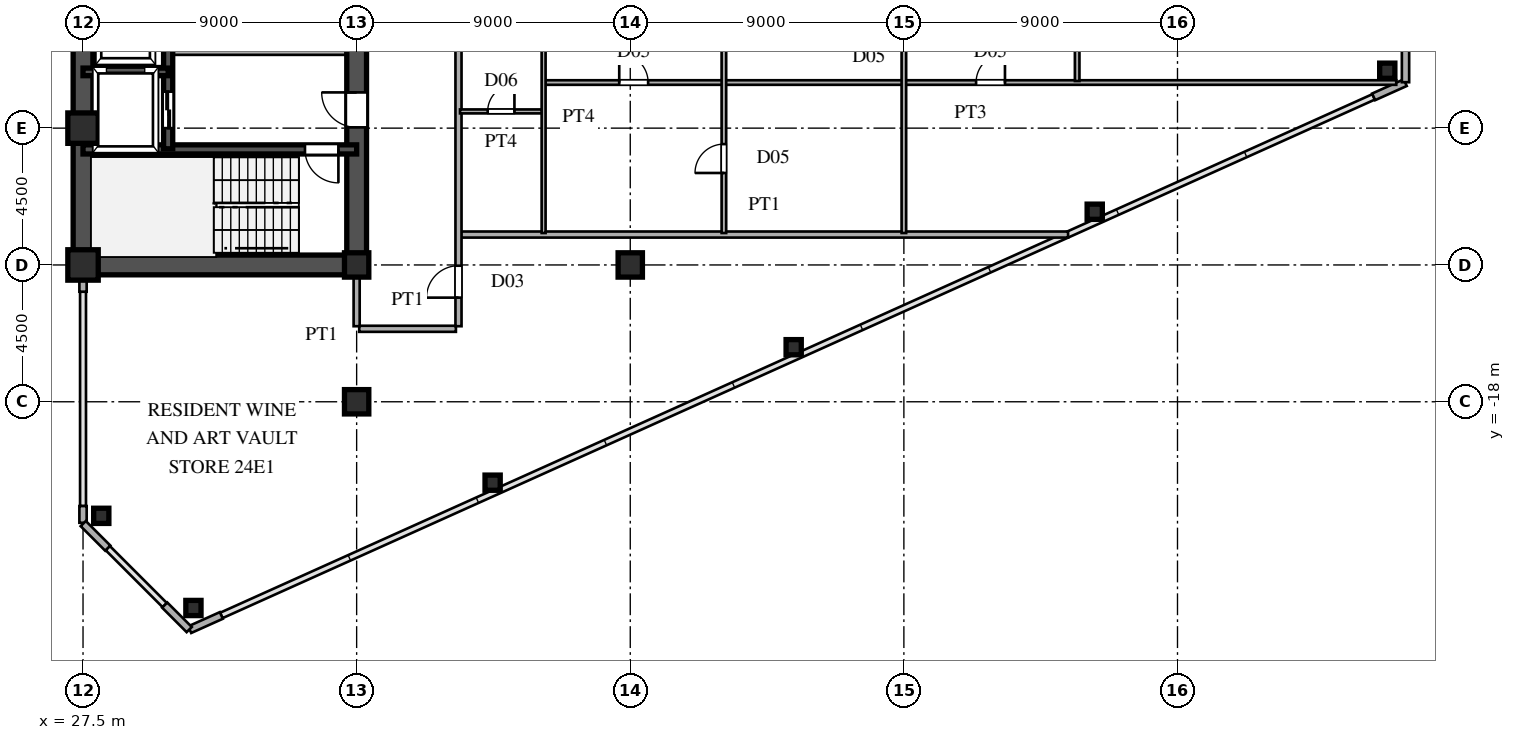
"""IFC4 building model, lengths in metres.
Left out: names, types, materials, properties, quantities, classifications, styles, units other than length and angle.
Written with IfcOpenShell. Run it as: python <this file> out.ifc"""

import sys

from ifc_helpers import new_model, si_unit, direction, frame, frame_2d, origin, origin_2d, place, context, subcontext, project, spatial, rectangle, hollow_rectangle, i_section, extrude, source, transform, mapped, element, fill, save


model = new_model("IFC4")
c1 = context("Model", 3, precision=1e-05, world=origin(), true_north=direction((0.0, 1.0)))
c2 = subcontext(c1, "Body", "Model", "MODEL_VIEW")
j1 = project(units=[si_unit("LENGTHUNIT", "METRE"), si_unit("PLANEANGLEUNIT", "RADIAN")], contexts=[c1])
p1 = place(None, origin())
s1 = spatial("IfcSite", under=j1, at=p1, CompositionType="ELEMENT")
p2 = place(p1, origin())
s2 = spatial("IfcBuilding", under=s1, at=p2, CompositionType="ELEMENT")
p3 = place(p2, frame((0.0, 0.0, 92.4)))
s3 = spatial("IfcBuildingStorey", under=s2, at=p3, CompositionType="ELEMENT", Elevation=92.4)
m1 = source(origin(), c2, "Body", "SweptSolid", [
    extrude(hollow_rectangle(XDim=1.0, YDim=1.0, WallThickness=0.042, at=origin_2d()), origin(), (0.0, 0.0, 1.0), 3.6),
])
for number, where, z_axis, x_axis in (
    (1, (27.5, -13.5, 0.0), (0.0, 0.0, 1.0), (1.0, 0.0, 0.0)),
    (2, (27.5, -9.0, 0.0), (0.0, 0.0, 1.0), (1.0, 0.0, 0.0)),
):
    element("IfcColumn", number, at=place(p3, frame(where, z_axis=z_axis, x_axis=x_axis)), inside=s3, PredefinedType="COLUMN", context=c2, shape_type="MappedRepresentation", body=[
        mapped(m1, transform((0.0, 0.0, 0.0), scale=1.0)),
    ])
m2 = source(origin(), c2, "Body", "SweptSolid", [
    extrude(i_section(OverallWidth=0.8, OverallDepth=0.8, WebThickness=0.032, FlangeThickness=0.05, at=origin_2d()), origin(), (0.0, 0.0, 1.0), 3.6),
])
for number, where, z_axis, x_axis in (
    (3, (36.5, -18.0, 0.0), (0.0, 0.0, 1.0), (1.0, 0.0, 0.0)),
    (4, (36.5, -13.5, 0.0), (0.0, 0.0, 1.0), (1.0, 0.0, 0.0)),
    (5, (45.5, -13.5, 0.0), (0.0, 0.0, 1.0), (1.0, 0.0, 0.0)),
):
    element("IfcColumn", number, at=place(p3, frame(where, z_axis=z_axis, x_axis=x_axis)), inside=s3, PredefinedType="COLUMN", context=c2, shape_type="MappedRepresentation", body=[
        mapped(m2, transform((0.0, 0.0, 0.0), scale=1.0)),
    ])
m3 = source(origin(), c2, "Body", "SweptSolid", [
    extrude(hollow_rectangle(XDim=0.5, YDim=0.5, WallThickness=0.02, at=origin_2d()), origin(), (0.0, 0.0, 1.0), 3.6),
])
for number, where, z_axis, x_axis in (
    (6, (31.131, -24.783, 0.0), (0.0, 0.0, 1.0), (1.0, 0.0, 0.0)),
    (7, (70.4, -7.112, 0.0), (0.0, 0.0, 1.0), (1.0, 0.0, 0.0)),
    (8, (28.1, -21.751, 0.0), (0.0, 0.0, 1.0), (1.0, 0.0, 0.0)),
    (9, (40.973, -20.661, 0.0), (0.0, 0.0, 1.0), (1.0, 0.0, 0.0)),
    (10, (50.875, -16.205, 0.0), (0.0, 0.0, 1.0), (1.0, 0.0, 0.0)),
    (11, (60.778, -11.749, 0.0), (0.0, 0.0, 1.0), (1.0, 0.0, 0.0)),
):
    element("IfcColumn", number, at=place(p3, frame(where, z_axis=z_axis, x_axis=x_axis)), inside=s3, PredefinedType="COLUMN", context=c2, shape_type="MappedRepresentation", body=[
        mapped(m3, transform((0.0, 0.0, 0.0), scale=1.0)),
    ])
for number, where, z_axis, x_axis in (
    (12, (31.009, -25.496, 0.0), (0.0, 0.0, 1.0), (0.912, 0.41, 0.0)),
    (13, (69.951, -7.972, 0.0), (0.0, 0.0, 1.0), (0.912, 0.41, 0.0)),
    (14, (71.0, -7.49, 0.0), (0.0, 0.0, 1.0), (0.0, 1.0, 0.0)),
):
    element("IfcWall", number, at=place(p3, frame(where, z_axis=z_axis, x_axis=x_axis)), inside=s3, PredefinedType="SOLIDWALL", context=c2, shape_type="SweptSolid", body=[
        extrude(rectangle(XDim=1.14, YDim=0.24, at=frame_2d((0.57, 0.0))), origin(), (0.0, 0.0, 1.0), 3.38),
    ])
p4 = place(p3, frame((27.5, -21.98, 0.0), z_axis=(0.0, 0.0, 1.0), x_axis=(0.0, 1.0, 0.0)))
e15 = element("IfcWall", 15, at=p4, inside=s3, PredefinedType="SOLIDWALL", context=c2, shape_type="SweptSolid", body=[
    extrude(rectangle(XDim=0.55, YDim=0.24, at=frame_2d((0.275, 0.0))), origin(), (0.0, 0.0, 1.0), 3.38),
])
p5 = place(p3, frame((27.5, -14.38, 0.0), z_axis=(0.0, 0.0, 1.0), x_axis=(0.0, 1.0, 0.0)))
e16 = element("IfcWall", 16, at=p5, inside=s3, PredefinedType="SOLIDWALL", context=c2, shape_type="SweptSolid", body=[
    extrude(rectangle(XDim=0.55, YDim=0.24, at=frame_2d((0.275, 0.0))), origin(), (0.0, 0.0, 1.0), 2.88),
])
for number, where, z_axis, x_axis in (
    (17, (27.507, -22.007, 0.0), (0.0, 0.0, 1.0), (0.707, -0.707, 0.0)),
    (18, (30.187, -24.687, 0.0), (0.0, 0.0, 1.0), (0.707, -0.707, 0.0)),
):
    element("IfcWall", number, at=place(p3, frame(where, z_axis=z_axis, x_axis=x_axis)), inside=s3, PredefinedType="SOLIDWALL", context=c2, shape_type="SweptSolid", body=[
        extrude(rectangle(XDim=1.14, YDim=0.24, at=frame_2d((0.57, 0.0))), origin(), (0.0, 0.0, 1.0), 3.38),
    ])
p6 = place(p3, frame((27.5, -13.5, 0.0), z_axis=(0.0, 0.0, 1.0), x_axis=(0.0, 1.0, 0.0)))
e19 = element("IfcWall", 19, at=p6, inside=s3, PredefinedType="SHEAR", context=c2, shape_type="SweptSolid", body=[
    extrude(rectangle(XDim=12.2, YDim=0.65, at=frame_2d((6.1, 0.0))), origin(), (0.0, 0.0, 1.0), 3.38),
])
p7 = place(p3, frame((27.5, -13.5, 0.0), z_axis=(0.0, 0.0, 1.0), x_axis=(1.0, 0.0, 0.0)))
e20 = element("IfcWall", 20, at=p7, inside=s3, PredefinedType="SHEAR", context=c2, shape_type="SweptSolid", body=[
    extrude(rectangle(XDim=9.0, YDim=0.65, at=frame_2d((4.5, 0.0))), origin(), (0.0, 0.0, 1.0), 3.38),
])
p8 = place(p3, frame((36.5, -13.65, 0.0), z_axis=(0.0, 0.0, 1.0), x_axis=(0.0, 1.0, 0.0)))
e21 = element("IfcWall", 21, at=p8, inside=s3, PredefinedType="SHEAR", context=c2, shape_type="SweptSolid", body=[
    extrude(rectangle(XDim=7.15, YDim=0.65, at=frame_2d((3.575, 0.0))), origin(), (0.0, 0.0, 1.0), 3.38),
])
p9 = place(p8, frame((4.675, 0.0, 0.0)))
e22 = element("IfcOpeningElement", 22, at=p9, cuts=e21, PredefinedType="OPENING", context=c2, shape_type="SweptSolid", body=[
    extrude(rectangle(XDim=1.15, YDim=2.2, at=frame_2d((0.575, 1.1))), frame((0.0, 0.335, 0.0), z_axis=(0.0, -1.0, 0.0), x_axis=(1.0, 0.0, 0.0)), (0.0, 0.0, 1.0), 0.67),
])
p10 = place(p3, frame((27.5, -9.7, 0.0), z_axis=(0.0, 0.0, 1.0), x_axis=(1.0, 0.0, 0.0)))
e23 = element("IfcWall", 23, at=p10, inside=s3, PredefinedType="SHEAR", context=c2, shape_type="SweptSolid", body=[
    extrude(rectangle(XDim=9.0, YDim=0.3, at=frame_2d((4.5, 0.0))), origin(), (0.0, 0.0, 1.0), 3.38),
])
p11 = place(p10, frame((7.3, 0.0, 0.0)))
e24 = element("IfcOpeningElement", 24, at=p11, cuts=e23, PredefinedType="OPENING", context=c2, shape_type="SweptSolid", body=[
    extrude(rectangle(XDim=1.1, YDim=2.2, at=frame_2d((0.55, 1.1))), frame((0.0, 0.16, 0.0), z_axis=(0.0, -1.0, 0.0), x_axis=(1.0, 0.0, 0.0)), (0.0, 0.0, 1.0), 0.32),
])
p12 = place(p3, frame((27.5, -7.15, 0.0), z_axis=(0.0, 0.0, 1.0), x_axis=(1.0, 0.0, 0.0)))
e25 = element("IfcWall", 25, at=p12, inside=s3, PredefinedType="SHEAR", context=c2, shape_type="SweptSolid", body=[
    extrude(rectangle(XDim=2.8, YDim=0.25, at=frame_2d((1.4, 0.0))), origin(), (0.0, 0.0, 1.0), 3.38),
])
p13 = place(p3, frame((30.3, -9.68, 0.0), z_axis=(0.0, 0.0, 1.0), x_axis=(0.0, 1.0, 0.0)))
e26 = element("IfcWall", 26, at=p13, inside=s3, PredefinedType="SHEAR", context=c2, shape_type="SweptSolid", body=[
    extrude(rectangle(XDim=2.56, YDim=0.3, at=frame_2d((1.28, 0.0))), origin(), (0.0, 0.0, 1.0), 3.38),
])
p14 = place(p13, frame((0.68, 0.0, 0.0)))
e27 = element("IfcOpeningElement", 27, at=p14, cuts=e26, PredefinedType="OPENING", context=c2, shape_type="SweptSolid", body=[
    extrude(rectangle(XDim=1.2, YDim=2.25, at=frame_2d((0.6, 1.125))), frame((0.0, 0.16, 0.0), z_axis=(0.0, -1.0, 0.0), x_axis=(1.0, 0.0, 0.0)), (0.0, 0.0, 1.0), 0.32),
])
p15 = place(p3, frame((30.3, -7.12, 0.0), z_axis=(0.0, 0.0, 1.0), x_axis=(0.0, 1.0, 0.0)))
e28 = element("IfcWall", 28, at=p15, inside=s3, PredefinedType="SHEAR", context=c2, shape_type="SweptSolid", body=[
    extrude(rectangle(XDim=2.92, YDim=0.3, at=frame_2d((1.46, 0.0))), origin(), (0.0, 0.0, 1.0), 3.38),
])
p16 = place(p15, frame((0.91, 0.0, 0.0)))
e29 = element("IfcOpeningElement", 29, at=p16, cuts=e28, PredefinedType="OPENING", context=c2, shape_type="SweptSolid", body=[
    extrude(rectangle(XDim=1.1, YDim=2.2, at=frame_2d((0.55, 1.1))), frame((0.0, 0.16, 0.0), z_axis=(0.0, -1.0, 0.0), x_axis=(1.0, 0.0, 0.0)), (0.0, 0.0, 1.0), 0.32),
])
p17 = place(p3, frame((30.45, -6.5, 0.0), z_axis=(0.0, 0.0, 1.0), x_axis=(1.0, 0.0, 0.0)))
e30 = element("IfcWall", 30, at=p17, inside=s3, PredefinedType="PARTITIONING", context=c2, shape_type="SweptSolid", body=[
    extrude(rectangle(XDim=5.7, YDim=0.18, at=frame_2d((2.85, 0.0))), origin(), (0.0, 0.0, 1.0), 3.38),
])
p18 = place(p3, frame((36.585, -15.6, 0.0), z_axis=(0.0, 0.0, 1.0), x_axis=(1.0, 0.0, 0.0)))
e31 = element("IfcWall", 31, at=p18, inside=s3, PredefinedType="PARTITIONING", context=c2, shape_type="SweptSolid", body=[
    extrude(rectangle(XDim=3.18, YDim=0.2, at=frame_2d((1.59, 0.0))), origin(), (0.0, 0.0, 1.0), 3.38),
])
p19 = place(p3, frame((39.93, -12.5, 0.0), z_axis=(0.0, 0.0, 1.0), x_axis=(1.0, 0.0, 0.0)))
e32 = element("IfcWall", 32, at=p19, inside=s3, PredefinedType="PARTITIONING", context=c2, shape_type="SweptSolid", body=[
    extrude(rectangle(XDim=19.971, YDim=0.2, at=frame_2d((9.985, 0.0))), origin(), (0.0, 0.0, 1.0), 3.38),
])
p20 = place(p3, frame((39.9, -8.45, 0.0), z_axis=(0.0, 0.0, 1.0), x_axis=(1.0, 0.0, 0.0)))
e33 = element("IfcWall", 33, at=p20, inside=s3, PredefinedType="PARTITIONING", context=c2, shape_type="SweptSolid", body=[
    extrude(rectangle(XDim=2.7, YDim=0.13, at=frame_2d((1.35, 0.0))), origin(), (0.0, 0.0, 1.0), 3.38),
])
p21 = place(p20, frame((0.91, 0.0, 0.0)))
e34 = element("IfcOpeningElement", 34, at=p21, cuts=e33, PredefinedType="OPENING", context=c2, shape_type="SweptSolid", body=[
    extrude(rectangle(XDim=0.88, YDim=2.1, at=frame_2d((0.44, 1.05))), frame((0.0, 0.075, 0.0), z_axis=(0.0, -1.0, 0.0), x_axis=(1.0, 0.0, 0.0)), (0.0, 0.0, 1.0), 0.15),
])
p22 = place(p3, frame((42.7, -7.5, 0.0), z_axis=(0.0, 0.0, 1.0), x_axis=(1.0, 0.0, 0.0)))
e35 = element("IfcWall", 35, at=p22, inside=s3, PredefinedType="PARTITIONING", context=c2, shape_type="SweptSolid", body=[
    extrude(rectangle(XDim=27.995, YDim=0.15, at=frame_2d((13.998, 0.0))), origin(), (0.0, 0.0, 1.0), 3.38),
])
p23 = place(p22, frame((2.438, 0.0, 0.0)))
e36 = element("IfcOpeningElement", 36, at=p23, cuts=e35, PredefinedType="OPENING", context=c2, shape_type="SweptSolid", body=[
    extrude(rectangle(XDim=0.95, YDim=2.15, at=frame_2d((0.475, 1.075))), frame((0.0, 0.085, 0.0), z_axis=(0.0, -1.0, 0.0), x_axis=(1.0, 0.0, 0.0)), (0.0, 0.0, 1.0), 0.17),
])
p24 = place(p22, frame((14.175, 0.0, 0.0)))
e37 = element("IfcOpeningElement", 37, at=p24, cuts=e35, PredefinedType="OPENING", context=c2, shape_type="SweptSolid", body=[
    extrude(rectangle(XDim=0.95, YDim=2.15, at=frame_2d((0.475, 1.075))), frame((0.0, 0.085, 0.0), z_axis=(0.0, -1.0, 0.0), x_axis=(1.0, 0.0, 0.0)), (0.0, 0.0, 1.0), 0.17),
])
p25 = place(p3, frame((36.5, -15.515, 0.0), z_axis=(0.0, 0.0, 1.0), x_axis=(0.0, 1.0, 0.0)))
e38 = element("IfcWall", 38, at=p25, inside=s3, PredefinedType="PARTITIONING", context=c2, shape_type="SweptSolid", body=[
    extrude(rectangle(XDim=1.685, YDim=0.2, at=frame_2d((0.842, 0.0))), origin(), (0.0, 0.0, 1.0), 2.68),
])
p26 = place(p3, frame((39.85, -15.515, 0.0), z_axis=(0.0, 0.0, 1.0), x_axis=(0.0, 1.0, 0.0)))
e39 = element("IfcWall", 39, at=p26, inside=s3, PredefinedType="PARTITIONING", context=c2, shape_type="SweptSolid", body=[
    extrude(rectangle(XDim=31.03, YDim=0.2, at=frame_2d((15.515, 0.0))), origin(), (0.0, 0.0, 1.0), 3.38),
])
p27 = place(p26, frame((0.94, 0.0, 0.0)))
e40 = element("IfcOpeningElement", 40, at=p27, cuts=e39, PredefinedType="OPENING", context=c2, shape_type="SweptSolid", body=[
    extrude(rectangle(XDim=1.05, YDim=2.25, at=frame_2d((0.525, 1.125))), frame((0.0, 0.11, 0.0), z_axis=(0.0, -1.0, 0.0), x_axis=(1.0, 0.0, 0.0)), (0.0, 0.0, 1.0), 0.22),
])
p28 = place(p26, frame((9.765, 0.0, 0.0)))
e41 = element("IfcOpeningElement", 41, at=p28, cuts=e39, PredefinedType="OPENING", context=c2, shape_type="SweptSolid", body=[
    extrude(rectangle(XDim=1.05, YDim=2.25, at=frame_2d((0.525, 1.125))), frame((0.0, 0.11, 0.0), z_axis=(0.0, -1.0, 0.0), x_axis=(1.0, 0.0, 0.0)), (0.0, 0.0, 1.0), 0.22),
])
p29 = place(p26, frame((24.067, 0.0, 0.0)))
e42 = element("IfcOpeningElement", 42, at=p29, cuts=e39, PredefinedType="OPENING", context=c2, shape_type="SweptSolid", body=[
    extrude(rectangle(XDim=1.05, YDim=2.25, at=frame_2d((0.525, 1.125))), frame((0.0, 0.11, 0.0), z_axis=(0.0, -1.0, 0.0), x_axis=(1.0, 0.0, 0.0)), (0.0, 0.0, 1.0), 0.22),
])
p30 = place(p3, frame((42.65, -12.45, 0.0), z_axis=(0.0, 0.0, 1.0), x_axis=(0.0, 1.0, 0.0)))
e43 = element("IfcWall", 43, at=p30, inside=s3, PredefinedType="PARTITIONING", context=c2, shape_type="SweptSolid", body=[
    extrude(rectangle(XDim=9.9, YDim=0.13, at=frame_2d((4.95, 0.0))), origin(), (0.0, 0.0, 1.0), 3.38),
])
p31 = place(p30, frame((6.975, 0.0, 0.0)))
e44 = element("IfcOpeningElement", 44, at=p31, cuts=e43, PredefinedType="OPENING", context=c2, shape_type="SweptSolid", body=[
    extrude(rectangle(XDim=0.95, YDim=2.15, at=frame_2d((0.475, 1.075))), frame((0.0, 0.075, 0.0), z_axis=(0.0, -1.0, 0.0), x_axis=(1.0, 0.0, 0.0)), (0.0, 0.0, 1.0), 0.15),
])
p32 = place(p3, frame((48.58, -12.45, 0.0), z_axis=(0.0, 0.0, 1.0), x_axis=(0.0, 1.0, 0.0)))
e45 = element("IfcWall", 45, at=p32, inside=s3, PredefinedType="PARTITIONING", context=c2, shape_type="SweptSolid", body=[
    extrude(rectangle(XDim=26.738, YDim=0.15, at=frame_2d((13.369, 0.0))), origin(), (0.0, 0.0, 1.0), 3.38),
])
p33 = place(p32, frame((6.975, 0.0, 0.0)))
e46 = element("IfcOpeningElement", 46, at=p33, cuts=e45, PredefinedType="OPENING", context=c2, shape_type="SweptSolid", body=[
    extrude(rectangle(XDim=0.95, YDim=2.15, at=frame_2d((0.475, 1.075))), frame((0.0, 0.085, 0.0), z_axis=(0.0, -1.0, 0.0), x_axis=(1.0, 0.0, 0.0)), (0.0, 0.0, 1.0), 0.17),
])
p34 = place(p32, frame((1.975, 0.0, 0.0)))
e47 = element("IfcOpeningElement", 47, at=p34, cuts=e45, PredefinedType="OPENING", context=c2, shape_type="SweptSolid", body=[
    extrude(rectangle(XDim=0.95, YDim=2.15, at=frame_2d((0.475, 1.075))), frame((0.0, 0.085, 0.0), z_axis=(0.0, -1.0, 0.0), x_axis=(1.0, 0.0, 0.0)), (0.0, 0.0, 1.0), 0.17),
])
p35 = place(p32, frame((23.354, 0.0, 0.0)))
e48 = element("IfcOpeningElement", 48, at=p35, cuts=e45, PredefinedType="OPENING", context=c2, shape_type="SweptSolid", body=[
    extrude(rectangle(XDim=0.95, YDim=2.15, at=frame_2d((0.475, 1.075))), frame((0.0, 0.085, 0.0), z_axis=(0.0, -1.0, 0.0), x_axis=(1.0, 0.0, 0.0)), (0.0, 0.0, 1.0), 0.17),
])
p36 = place(p32, frame((17.435, 0.0, 0.0)))
e49 = element("IfcOpeningElement", 49, at=p36, cuts=e45, PredefinedType="OPENING", context=c2, shape_type="SweptSolid", body=[
    extrude(rectangle(XDim=0.95, YDim=2.15, at=frame_2d((0.475, 1.075))), frame((0.0, 0.085, 0.0), z_axis=(0.0, -1.0, 0.0), x_axis=(1.0, 0.0, 0.0)), (0.0, 0.0, 1.0), 0.17),
])
p37 = place(p3, frame((54.5, -12.45, 0.0), z_axis=(0.0, 0.0, 1.0), x_axis=(0.0, 1.0, 0.0)))
e50 = element("IfcWall", 50, at=p37, inside=s3, PredefinedType="PARTITIONING", context=c2, shape_type="SweptSolid", body=[
    extrude(rectangle(XDim=26.738, YDim=0.15, at=frame_2d((13.369, 0.0))), origin(), (0.0, 0.0, 1.0), 2.68),
])
p38 = place(p37, frame((6.458, 0.0, 0.0)))
e51 = element("IfcOpeningElement", 51, at=p38, cuts=e50, PredefinedType="OPENING", context=c2, shape_type="SweptSolid", body=[
    extrude(rectangle(XDim=0.95, YDim=2.15, at=frame_2d((0.475, 1.075))), frame((0.0, 0.085, 0.0), z_axis=(0.0, -1.0, 0.0), x_axis=(1.0, 0.0, 0.0)), (0.0, 0.0, 1.0), 0.17),
])
p39 = place(p37, frame((11.975, 0.0, 0.0)))
e52 = element("IfcOpeningElement", 52, at=p39, cuts=e50, PredefinedType="OPENING", context=c2, shape_type="SweptSolid", body=[
    extrude(rectangle(XDim=0.95, YDim=2.15, at=frame_2d((0.475, 1.075))), frame((0.0, 0.085, 0.0), z_axis=(0.0, -1.0, 0.0), x_axis=(1.0, 0.0, 0.0)), (0.0, 0.0, 1.0), 0.17),
])
p40 = place(p37, frame((23.354, 0.0, 0.0)))
e53 = element("IfcOpeningElement", 53, at=p40, cuts=e50, PredefinedType="OPENING", context=c2, shape_type="SweptSolid", body=[
    extrude(rectangle(XDim=0.95, YDim=2.15, at=frame_2d((0.475, 1.075))), frame((0.0, 0.085, 0.0), z_axis=(0.0, -1.0, 0.0), x_axis=(1.0, 0.0, 0.0)), (0.0, 0.0, 1.0), 0.17),
])
p41 = place(p37, frame((17.435, 0.0, 0.0)))
e54 = element("IfcOpeningElement", 54, at=p41, cuts=e50, PredefinedType="OPENING", context=c2, shape_type="SweptSolid", body=[
    extrude(rectangle(XDim=0.95, YDim=2.15, at=frame_2d((0.475, 1.075))), frame((0.0, 0.085, 0.0), z_axis=(0.0, -1.0, 0.0), x_axis=(1.0, 0.0, 0.0)), (0.0, 0.0, 1.0), 0.17),
])
p42 = place(p3, frame((60.2, -7.45, 0.0), z_axis=(0.0, 0.0, 1.0), x_axis=(0.0, 1.0, 0.0)))
e55 = element("IfcWall", 55, at=p42, inside=s3, PredefinedType="PARTITIONING", context=c2, shape_type="SweptSolid", body=[
    extrude(rectangle(XDim=15.819, YDim=0.15, at=frame_2d((7.909, 0.0))), origin(), (0.0, 0.0, 1.0), 3.38),
])
p43 = place(p42, frame((1.975, 0.0, 0.0)))
e56 = element("IfcOpeningElement", 56, at=p43, cuts=e55, PredefinedType="OPENING", context=c2, shape_type="SweptSolid", body=[
    extrude(rectangle(XDim=0.95, YDim=2.15, at=frame_2d((0.475, 1.075))), frame((0.0, 0.085, 0.0), z_axis=(0.0, -1.0, 0.0), x_axis=(1.0, 0.0, 0.0)), (0.0, 0.0, 1.0), 0.17),
])
p44 = place(p42, frame((6.975, 0.0, 0.0)))
e57 = element("IfcOpeningElement", 57, at=p44, cuts=e55, PredefinedType="OPENING", context=c2, shape_type="SweptSolid", body=[
    extrude(rectangle(XDim=0.95, YDim=2.15, at=frame_2d((0.475, 1.075))), frame((0.0, 0.085, 0.0), z_axis=(0.0, -1.0, 0.0), x_axis=(1.0, 0.0, 0.0)), (0.0, 0.0, 1.0), 0.17),
])
p45 = place(p42, frame((12.435, 0.0, 0.0)))
e58 = element("IfcOpeningElement", 58, at=p45, cuts=e55, PredefinedType="OPENING", context=c2, shape_type="SweptSolid", body=[
    extrude(rectangle(XDim=0.95, YDim=2.15, at=frame_2d((0.475, 1.075))), frame((0.0, 0.085, 0.0), z_axis=(0.0, -1.0, 0.0), x_axis=(1.0, 0.0, 0.0)), (0.0, 0.0, 1.0), 0.17),
])
m4 = source(origin(), c2, "Body", "SweptSolid", [
    extrude(rectangle(XDim=1.15, YDim=2.2, at=frame_2d((0.575, 1.1))), frame((0.0, 0.025, 0.0), z_axis=(0.0, -1.0, 0.0), x_axis=(1.0, 0.0, 0.0)), (0.0, 0.0, 1.0), 0.05),
])
p46 = place(p9, origin())
e59 = element("IfcDoor", 59, at=p46, inside=s3, OperationType="SINGLE_SWING_RIGHT", PredefinedType="DOOR", context=c2, shape_type="MappedRepresentation", body=[
    mapped(m4, transform((0.0, 0.0, 0.0), scale=1.0)),
])
fill(e22, e59)
m5 = source(origin(), c2, "Body", "SweptSolid", [
    extrude(rectangle(XDim=1.1, YDim=2.2, at=frame_2d((0.55, 1.1))), frame((0.0, 0.025, 0.0), z_axis=(0.0, -1.0, 0.0), x_axis=(1.0, 0.0, 0.0)), (0.0, 0.0, 1.0), 0.05),
])
p47 = place(p11, frame((1.1, 0.0, 0.0), z_axis=(0.0, 0.0, 1.0), x_axis=(-1.0, 0.0, 0.0)))
e60 = element("IfcDoor", 60, at=p47, inside=s3, OperationType="SINGLE_SWING_RIGHT", PredefinedType="DOOR", context=c2, shape_type="MappedRepresentation", body=[
    mapped(m5, transform((0.0, 0.0, 0.0), scale=1.0)),
])
fill(e24, e60)
m6 = source(origin(), c2, "Body", "SweptSolid", [
    extrude(rectangle(XDim=1.2, YDim=2.25, at=frame_2d((0.6, 1.125))), frame((0.0, 0.025, 0.0), z_axis=(0.0, -1.0, 0.0), x_axis=(1.0, 0.0, 0.0)), (0.0, 0.0, 1.0), 0.05),
])
p48 = place(p14, origin())
e61 = element("IfcDoor", 61, at=p48, inside=s3, OperationType="DOUBLE_DOOR_SLIDING", PredefinedType="DOOR", context=c2, shape_type="MappedRepresentation", body=[
    mapped(m6, transform((0.0, 0.0, 0.0), scale=1.0)),
])
fill(e27, e61)
m7 = source(origin(), c2, "Body", "SweptSolid", [
    extrude(rectangle(XDim=0.88, YDim=2.1, at=frame_2d((0.44, 1.05))), frame((0.0, 0.025, 0.0), z_axis=(0.0, -1.0, 0.0), x_axis=(1.0, 0.0, 0.0)), (0.0, 0.0, 1.0), 0.05),
])
p49 = place(p21, origin())
e62 = element("IfcDoor", 62, at=p49, inside=s3, OperationType="SINGLE_SWING_RIGHT", PredefinedType="DOOR", context=c2, shape_type="MappedRepresentation", body=[
    mapped(m7, transform((0.0, 0.0, 0.0), scale=1.0)),
])
fill(e34, e62)
m8 = source(origin(), c2, "Body", "SweptSolid", [
    extrude(rectangle(XDim=0.95, YDim=2.15, at=frame_2d((0.475, 1.075))), frame((0.0, 0.025, 0.0), z_axis=(0.0, -1.0, 0.0), x_axis=(1.0, 0.0, 0.0)), (0.0, 0.0, 1.0), 0.05),
])
p50 = place(p23, origin())
e63 = element("IfcDoor", 63, at=p50, inside=s3, OperationType="SINGLE_SWING_LEFT", PredefinedType="DOOR", context=c2, shape_type="MappedRepresentation", body=[
    mapped(m8, transform((0.0, 0.0, 0.0), scale=1.0)),
])
fill(e36, e63)
p51 = place(p24, origin())
e64 = element("IfcDoor", 64, at=p51, inside=s3, OperationType="SINGLE_SWING_RIGHT", PredefinedType="DOOR", context=c2, shape_type="MappedRepresentation", body=[
    mapped(m8, transform((0.0, 0.0, 0.0), scale=1.0)),
])
fill(e37, e64)
m9 = source(origin(), c2, "Body", "SweptSolid", [
    extrude(rectangle(XDim=1.05, YDim=2.25, at=frame_2d((0.525, 1.125))), frame((0.0, 0.025, 0.0), z_axis=(0.0, -1.0, 0.0), x_axis=(1.0, 0.0, 0.0)), (0.0, 0.0, 1.0), 0.05),
])
p52 = place(p27, origin())
e65 = element("IfcDoor", 65, at=p52, inside=s3, OperationType="SINGLE_SWING_LEFT", PredefinedType="DOOR", context=c2, shape_type="MappedRepresentation", body=[
    mapped(m9, transform((0.0, 0.0, 0.0), scale=1.0)),
])
fill(e40, e65)
p53 = place(p34, origin())
e66 = element("IfcDoor", 66, at=p53, inside=s3, OperationType="SINGLE_SWING_LEFT", PredefinedType="DOOR", context=c2, shape_type="MappedRepresentation", body=[
    mapped(m8, transform((0.0, 0.0, 0.0), scale=1.0)),
])
fill(e47, e66)
save(model, sys.argv[1])
